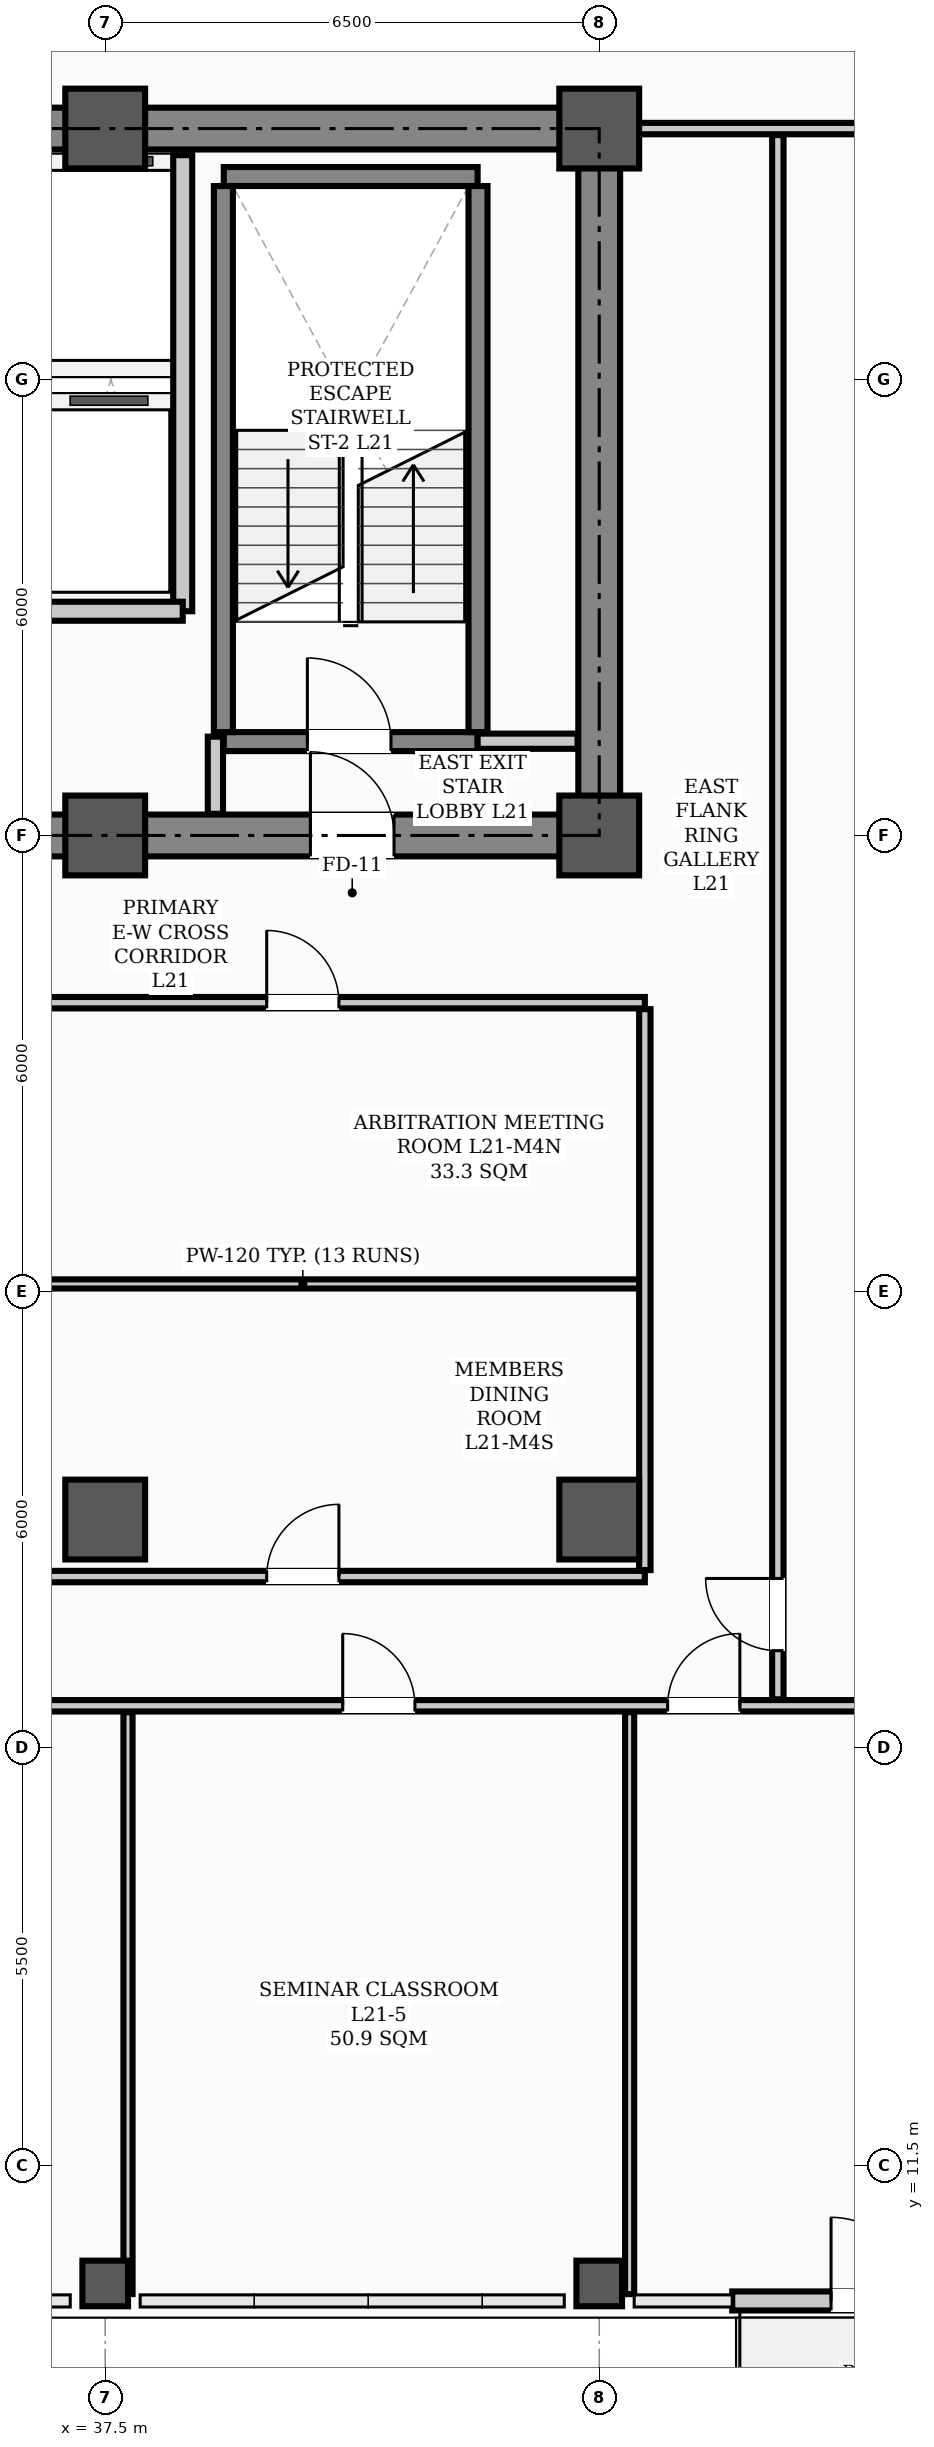
"""IFC4 building model, lengths in metres.
Left out: names, types, materials, properties, quantities, classifications, styles, units other than length and angle.
Written with IfcOpenShell. Run it as: python <this file> out.ifc"""

import sys

from ifc_helpers import new_model, si_unit, direction, frame, frame_2d, origin, origin_2d, place, context, subcontext, project, spatial, rectangle, hollow_rectangle, extrude, element, fill, save


model = new_model("IFC4")
c1 = context("Model", 3, precision=1e-05, world=origin(), true_north=direction((0.0, 1.0)))
c2 = subcontext(c1, "Body", "Model", "MODEL_VIEW")
j1 = project(units=[si_unit("LENGTHUNIT", "METRE"), si_unit("PLANEANGLEUNIT", "RADIAN")], contexts=[c1])
p1 = place(None, origin())
s1 = spatial("IfcSite", under=j1, at=p1, CompositionType="ELEMENT")
p2 = place(p1, origin())
s2 = spatial("IfcBuilding", under=s1, at=p2, CompositionType="ELEMENT")
p3 = place(p2, frame((0.0, 0.0, 85.0)))
s3 = spatial("IfcBuildingStorey", under=s2, at=p3, CompositionType="ELEMENT", Elevation=85.0)
for number, where, z_axis, x_axis in (
    (1, (37.5, 29.0, 0.0), (0.0, 0.0, 1.0), (1.0, 0.0, 0.0)),
    (2, (37.5, 38.3, 0.0), (0.0, 0.0, 1.0), (1.0, 0.0, 0.0)),
    (3, (44.0, 29.0, 0.0), (0.0, 0.0, 1.0), (1.0, 0.0, 0.0)),
    (4, (44.0, 38.3, 0.0), (0.0, 0.0, 1.0), (1.0, 0.0, 0.0)),
    (5, (37.5, 20.0, 0.0), (0.0, 0.0, 1.0), (1.0, 0.0, 0.0)),
    (6, (44.0, 20.0, 0.0), (0.0, 0.0, 1.0), (1.0, 0.0, 0.0)),
):
    element("IfcColumn", number, at=place(p3, frame(where, z_axis=z_axis, x_axis=x_axis)), inside=s3, PredefinedType="COLUMN", context=c2, shape_type="SweptSolid", body=[
        extrude(hollow_rectangle(XDim=1.05, YDim=1.05, WallThickness=0.038, InnerFilletRadius=0.019, OuterFilletRadius=0.057, at=origin_2d()), origin(), (0.0, 0.0, 1.0), 3.9),
    ])
for number, where, z_axis, x_axis in (
    (7, (37.5, 9.95, 0.0), (0.0, 0.0, 1.0), (1.0, 0.0, 0.0)),
    (8, (44.0, 9.95, 0.0), (0.0, 0.0, 1.0), (1.0, 0.0, 0.0)),
):
    element("IfcColumn", number, at=place(p3, frame(where, z_axis=z_axis, x_axis=x_axis)), inside=s3, PredefinedType="COLUMN", context=c2, shape_type="SweptSolid", body=[
        extrude(hollow_rectangle(XDim=0.6, YDim=0.6, WallThickness=0.026, InnerFilletRadius=0.013, OuterFilletRadius=0.039, at=origin_2d()), origin(), (0.0, 0.0, 1.0), 3.9),
    ])
p4 = place(p3, frame((45.75, 9.72, 0.0), z_axis=(0.0, 0.0, 1.0), x_axis=(1.0, 0.0, 0.0)))
e9 = element("IfcWall", 9, at=p4, inside=s3, PredefinedType="STANDARD", context=c2, shape_type="SweptSolid", body=[
    extrude(rectangle(XDim=3.7, YDim=0.25, at=frame_2d((1.85, 0.0))), origin(), (0.0, 0.0, 1.0), 3.18),
])
p5 = place(p4, frame((1.3, 0.0, 0.0)))
e10 = element("IfcOpeningElement", 10, at=p5, cuts=e9, PredefinedType="OPENING", context=c2, shape_type="SweptSolid", body=[
    extrude(rectangle(XDim=1.1, YDim=2.2, at=frame_2d((0.55, 1.1))), frame((0.0, 0.135, 0.0), z_axis=(0.0, -1.0, 0.0), x_axis=(1.0, 0.0, 0.0)), (0.0, 0.0, 1.0), 0.27),
])
p6 = place(p3, frame((13.5, 29.0, 0.0), z_axis=(0.0, 0.0, 1.0), x_axis=(1.0, 0.0, 0.0)))
e11 = element("IfcWall", 11, at=p6, inside=s3, PredefinedType="SHEAR", context=c2, shape_type="SweptSolid", body=[
    extrude(rectangle(XDim=30.5, YDim=0.55, at=frame_2d((15.25, 0.0))), origin(), (0.0, 0.0, 1.0), 3.72),
])
p7 = place(p6, frame((1.75, 0.0, 0.0)))
e12 = element("IfcOpeningElement", 12, at=p7, cuts=e11, PredefinedType="OPENING", context=c2, shape_type="SweptSolid", body=[
    extrude(rectangle(XDim=1.1, YDim=2.08, at=frame_2d((0.55, 1.04))), frame((0.0, 0.285, 0.0), z_axis=(0.0, -1.0, 0.0), x_axis=(1.0, 0.0, 0.0)), (0.0, 0.0, 1.0), 0.57),
])
p8 = place(p6, frame((26.7, 0.0, 0.0)))
e13 = element("IfcOpeningElement", 13, at=p8, cuts=e11, PredefinedType="OPENING", context=c2, shape_type="SweptSolid", body=[
    extrude(rectangle(XDim=1.1, YDim=2.08, at=frame_2d((0.55, 1.04))), frame((0.0, 0.285, 0.0), z_axis=(0.0, -1.0, 0.0), x_axis=(1.0, 0.0, 0.0)), (0.0, 0.0, 1.0), 0.57),
])
p9 = place(p6, frame((6.8, 0.0, 0.0)))
e14 = element("IfcOpeningElement", 14, at=p9, cuts=e11, PredefinedType="OPENING", context=c2, shape_type="SweptSolid", body=[
    extrude(rectangle(XDim=1.1, YDim=2.08, at=frame_2d((0.55, 1.04))), frame((0.0, 0.285, 0.0), z_axis=(0.0, -1.0, 0.0), x_axis=(1.0, 0.0, 0.0)), (0.0, 0.0, 1.0), 0.57),
])
p10 = place(p6, frame((13.2, 0.0, 0.0)))
e15 = element("IfcOpeningElement", 15, at=p10, cuts=e11, PredefinedType="OPENING", context=c2, shape_type="SweptSolid", body=[
    extrude(rectangle(XDim=1.6, YDim=2.08, at=frame_2d((0.8, 1.04))), frame((0.0, 0.285, 0.0), z_axis=(0.0, -1.0, 0.0), x_axis=(1.0, 0.0, 0.0)), (0.0, 0.0, 1.0), 0.57),
])
p11 = place(p6, frame((19.5, 0.0, 0.0)))
e16 = element("IfcOpeningElement", 16, at=p11, cuts=e11, PredefinedType="OPENING", context=c2, shape_type="SweptSolid", body=[
    extrude(rectangle(XDim=0.9, YDim=2.08, at=frame_2d((0.45, 1.04))), frame((0.0, 0.285, 0.0), z_axis=(0.0, -1.0, 0.0), x_axis=(1.0, 0.0, 0.0)), (0.0, 0.0, 1.0), 0.57),
])
p12 = place(p6, frame((21.55, 0.0, 0.0)))
e17 = element("IfcOpeningElement", 17, at=p12, cuts=e11, PredefinedType="OPENING", context=c2, shape_type="SweptSolid", body=[
    extrude(rectangle(XDim=0.9, YDim=2.08, at=frame_2d((0.45, 1.04))), frame((0.0, 0.285, 0.0), z_axis=(0.0, -1.0, 0.0), x_axis=(1.0, 0.0, 0.0)), (0.0, 0.0, 1.0), 0.57),
])
p13 = place(p3, frame((13.5, 38.3, 0.0), z_axis=(0.0, 0.0, 1.0), x_axis=(1.0, 0.0, 0.0)))
e18 = element("IfcWall", 18, at=p13, inside=s3, PredefinedType="SHEAR", context=c2, shape_type="SweptSolid", body=[
    extrude(rectangle(XDim=30.5, YDim=0.55, at=frame_2d((15.25, 0.0))), origin(), (0.0, 0.0, 1.0), 3.72),
])
p14 = place(p3, frame((44.0, 29.35, 0.0), z_axis=(0.0, 0.0, 1.0), x_axis=(0.0, 1.0, 0.0)))
e19 = element("IfcWall", 19, at=p14, inside=s3, PredefinedType="SHEAR", context=c2, shape_type="SweptSolid", body=[
    extrude(rectangle(XDim=8.6, YDim=0.55, at=frame_2d((4.3, 0.0))), origin(), (0.0, 0.0, 1.0), 3.72),
])
p15 = place(p3, frame((39.06, 30.235, 0.0), z_axis=(0.0, 0.0, 1.0), x_axis=(1.0, 0.0, 0.0)))
e20 = element("IfcWall", 20, at=p15, inside=s3, PredefinedType="STANDARD", context=c2, shape_type="SweptSolid", body=[
    extrude(rectangle(XDim=3.34, YDim=0.25, at=frame_2d((1.67, 0.0))), origin(), (0.0, 0.0, 1.0), 3.72),
])
p16 = place(p15, frame((1.1, 0.0, 0.0)))
e21 = element("IfcOpeningElement", 21, at=p16, cuts=e20, PredefinedType="OPENING", context=c2, shape_type="SweptSolid", body=[
    extrude(rectangle(XDim=1.1, YDim=2.08, at=frame_2d((0.55, 1.04))), frame((0.0, 0.135, 0.0), z_axis=(0.0, -1.0, 0.0), x_axis=(1.0, 0.0, 0.0)), (0.0, 0.0, 1.0), 0.27),
])
p17 = place(p3, frame((39.06, 37.669, 0.0), z_axis=(0.0, 0.0, 1.0), x_axis=(1.0, 0.0, 0.0)))
e22 = element("IfcWall", 22, at=p17, inside=s3, PredefinedType="STANDARD", context=c2, shape_type="SweptSolid", body=[
    extrude(rectangle(XDim=3.34, YDim=0.25, at=frame_2d((1.67, 0.0))), origin(), (0.0, 0.0, 1.0), 3.72),
])
for number, where, z_axis, x_axis in (
    (23, (39.055, 30.36, 0.0), (0.0, 0.0, 1.0), (0.0, 1.0, 0.0)),
    (24, (42.405, 30.36, 0.0), (0.0, 0.0, 1.0), (0.0, 1.0, 0.0)),
):
    element("IfcWall", number, at=place(p3, frame(where, z_axis=z_axis, x_axis=x_axis)), inside=s3, PredefinedType="STANDARD", context=c2, shape_type="SweptSolid", body=[
        extrude(rectangle(XDim=7.184, YDim=0.25, at=frame_2d((3.592, 0.0))), origin(), (0.0, 0.0, 1.0), 3.72),
    ])
p18 = place(p3, frame((38.52, 31.95, 0.0), z_axis=(0.0, 0.0, 1.0), x_axis=(0.0, 1.0, 0.0)))
e25 = element("IfcWall", 25, at=p18, inside=s3, PredefinedType="STANDARD", context=c2, shape_type="SweptSolid", body=[
    extrude(rectangle(XDim=6.0, YDim=0.25, at=frame_2d((3.0, 0.0))), origin(), (0.0, 0.0, 1.0), 3.3),
])
p19 = place(p3, frame((36.62, 31.95, 0.0), z_axis=(0.0, 0.0, 1.0), x_axis=(1.0, 0.0, 0.0)))
e26 = element("IfcWall", 26, at=p19, inside=s3, PredefinedType="STANDARD", context=c2, shape_type="SweptSolid", body=[
    extrude(rectangle(XDim=1.9, YDim=0.25, at=frame_2d((0.95, 0.0))), origin(), (0.0, 0.0, 1.0), 3.48),
])
p20 = place(p3, frame((42.4, 30.24, 0.0), z_axis=(0.0, 0.0, 1.0), x_axis=(1.0, 0.0, 0.0)))
e27 = element("IfcWall", 27, at=p20, inside=s3, PredefinedType="STANDARD", context=c2, shape_type="SweptSolid", body=[
    extrude(rectangle(XDim=1.315, YDim=0.2, at=frame_2d((0.658, 0.0))), origin(), (0.0, 0.0, 1.0), 3.1),
])
p21 = place(p3, frame((12.9, 26.8, 0.0), z_axis=(0.0, 0.0, 1.0), x_axis=(1.0, 0.0, 0.0)))
e28 = element("IfcWall", 28, at=p21, inside=s3, PredefinedType="PARTITIONING", context=c2, shape_type="SweptSolid", body=[
    extrude(rectangle(XDim=31.7, YDim=0.15, at=frame_2d((15.85, 0.0))), origin(), (0.0, 0.0, 1.0), 3.1),
])
p22 = place(p21, frame((13.6, 0.0, 0.0)))
e29 = element("IfcOpeningElement", 29, at=p22, cuts=e28, PredefinedType="OPENING", context=c2, shape_type="SweptSolid", body=[
    extrude(rectangle(XDim=1.6, YDim=2.08, at=frame_2d((0.8, 1.04))), frame((0.0, 0.085, 0.0), z_axis=(0.0, -1.0, 0.0), x_axis=(1.0, 0.0, 0.0)), (0.0, 0.0, 1.0), 0.17),
])
p23 = place(p21, frame((3.275, 0.0, 0.0)))
e30 = element("IfcOpeningElement", 30, at=p23, cuts=e28, PredefinedType="OPENING", context=c2, shape_type="SweptSolid", body=[
    extrude(rectangle(XDim=0.95, YDim=2.08, at=frame_2d((0.475, 1.04))), frame((0.0, 0.085, 0.0), z_axis=(0.0, -1.0, 0.0), x_axis=(1.0, 0.0, 0.0)), (0.0, 0.0, 1.0), 0.17),
])
p24 = place(p21, frame((9.025, 0.0, 0.0)))
e31 = element("IfcOpeningElement", 31, at=p24, cuts=e28, PredefinedType="OPENING", context=c2, shape_type="SweptSolid", body=[
    extrude(rectangle(XDim=0.95, YDim=2.08, at=frame_2d((0.475, 1.04))), frame((0.0, 0.085, 0.0), z_axis=(0.0, -1.0, 0.0), x_axis=(1.0, 0.0, 0.0)), (0.0, 0.0, 1.0), 0.17),
])
p25 = place(p21, frame((19.525, 0.0, 0.0)))
e32 = element("IfcOpeningElement", 32, at=p25, cuts=e28, PredefinedType="OPENING", context=c2, shape_type="SweptSolid", body=[
    extrude(rectangle(XDim=0.95, YDim=2.08, at=frame_2d((0.475, 1.04))), frame((0.0, 0.085, 0.0), z_axis=(0.0, -1.0, 0.0), x_axis=(1.0, 0.0, 0.0)), (0.0, 0.0, 1.0), 0.17),
])
p26 = place(p21, frame((26.725, 0.0, 0.0)))
e33 = element("IfcOpeningElement", 33, at=p26, cuts=e28, PredefinedType="OPENING", context=c2, shape_type="SweptSolid", body=[
    extrude(rectangle(XDim=0.95, YDim=2.08, at=frame_2d((0.475, 1.04))), frame((0.0, 0.085, 0.0), z_axis=(0.0, -1.0, 0.0), x_axis=(1.0, 0.0, 0.0)), (0.0, 0.0, 1.0), 0.17),
])
p27 = place(p3, frame((7.81, 17.55, 0.0), z_axis=(0.0, 0.0, 1.0), x_axis=(1.0, 0.0, 0.0)))
e34 = element("IfcWall", 34, at=p27, inside=s3, PredefinedType="PARTITIONING", context=c2, shape_type="SweptSolid", body=[
    extrude(rectangle(XDim=49.38, YDim=0.15, at=frame_2d((24.69, 0.0))), origin(), (0.0, 0.0, 1.0), 3.1),
])
p28 = place(p27, frame((7.465, 0.0, 0.0)))
e35 = element("IfcOpeningElement", 35, at=p28, cuts=e34, PredefinedType="OPENING", context=c2, shape_type="SweptSolid", body=[
    extrude(rectangle(XDim=0.95, YDim=2.08, at=frame_2d((0.475, 1.04))), frame((0.0, 0.085, 0.0), z_axis=(0.0, -1.0, 0.0), x_axis=(1.0, 0.0, 0.0)), (0.0, 0.0, 1.0), 0.17),
])
p29 = place(p27, frame((11.915, 0.0, 0.0)))
e36 = element("IfcOpeningElement", 36, at=p29, cuts=e34, PredefinedType="OPENING", context=c2, shape_type="SweptSolid", body=[
    extrude(rectangle(XDim=0.95, YDim=2.08, at=frame_2d((0.475, 1.04))), frame((0.0, 0.085, 0.0), z_axis=(0.0, -1.0, 0.0), x_axis=(1.0, 0.0, 0.0)), (0.0, 0.0, 1.0), 0.17),
])
p30 = place(p27, frame((18.915, 0.0, 0.0)))
e37 = element("IfcOpeningElement", 37, at=p30, cuts=e34, PredefinedType="OPENING", context=c2, shape_type="SweptSolid", body=[
    extrude(rectangle(XDim=0.95, YDim=2.08, at=frame_2d((0.475, 1.04))), frame((0.0, 0.085, 0.0), z_axis=(0.0, -1.0, 0.0), x_axis=(1.0, 0.0, 0.0)), (0.0, 0.0, 1.0), 0.17),
])
p31 = place(p27, frame((26.015, 0.0, 0.0)))
e38 = element("IfcOpeningElement", 38, at=p31, cuts=e34, PredefinedType="OPENING", context=c2, shape_type="SweptSolid", body=[
    extrude(rectangle(XDim=0.95, YDim=2.08, at=frame_2d((0.475, 1.04))), frame((0.0, 0.085, 0.0), z_axis=(0.0, -1.0, 0.0), x_axis=(1.0, 0.0, 0.0)), (0.0, 0.0, 1.0), 0.17),
])
p32 = place(p27, frame((32.815, 0.0, 0.0)))
e39 = element("IfcOpeningElement", 39, at=p32, cuts=e34, PredefinedType="OPENING", context=c2, shape_type="SweptSolid", body=[
    extrude(rectangle(XDim=0.95, YDim=2.08, at=frame_2d((0.475, 1.04))), frame((0.0, 0.085, 0.0), z_axis=(0.0, -1.0, 0.0), x_axis=(1.0, 0.0, 0.0)), (0.0, 0.0, 1.0), 0.17),
])
p33 = place(p27, frame((37.09, 0.0, 0.0)))
e40 = element("IfcOpeningElement", 40, at=p33, cuts=e34, PredefinedType="OPENING", context=c2, shape_type="SweptSolid", body=[
    extrude(rectangle(XDim=0.95, YDim=2.08, at=frame_2d((0.475, 1.04))), frame((0.0, 0.085, 0.0), z_axis=(0.0, -1.0, 0.0), x_axis=(1.0, 0.0, 0.0)), (0.0, 0.0, 1.0), 0.17),
])
p34 = place(p3, frame((28.4, 19.25, 0.0), z_axis=(0.0, 0.0, 1.0), x_axis=(1.0, 0.0, 0.0)))
e41 = element("IfcWall", 41, at=p34, inside=s3, PredefinedType="PARTITIONING", context=c2, shape_type="SweptSolid", body=[
    extrude(rectangle(XDim=16.2, YDim=0.15, at=frame_2d((8.1, 0.0))), origin(), (0.0, 0.0, 1.0), 3.1),
])
p35 = place(p34, frame((4.025, 0.0, 0.0)))
e42 = element("IfcOpeningElement", 42, at=p35, cuts=e41, PredefinedType="OPENING", context=c2, shape_type="SweptSolid", body=[
    extrude(rectangle(XDim=0.95, YDim=2.08, at=frame_2d((0.475, 1.04))), frame((0.0, 0.085, 0.0), z_axis=(0.0, -1.0, 0.0), x_axis=(1.0, 0.0, 0.0)), (0.0, 0.0, 1.0), 0.17),
])
p36 = place(p34, frame((11.225, 0.0, 0.0)))
e43 = element("IfcOpeningElement", 43, at=p36, cuts=e41, PredefinedType="OPENING", context=c2, shape_type="SweptSolid", body=[
    extrude(rectangle(XDim=0.95, YDim=2.08, at=frame_2d((0.475, 1.04))), frame((0.0, 0.085, 0.0), z_axis=(0.0, -1.0, 0.0), x_axis=(1.0, 0.0, 0.0)), (0.0, 0.0, 1.0), 0.17),
])
p37 = place(p3, frame((44.0, 38.3, 0.0), z_axis=(0.0, 0.0, 1.0), x_axis=(1.0, 0.0, 0.0)))
e44 = element("IfcWall", 44, at=p37, inside=s3, PredefinedType="PARTITIONING", context=c2, shape_type="SweptSolid", body=[
    extrude(rectangle(XDim=13.19, YDim=0.15, at=frame_2d((6.595, 0.0))), origin(), (0.0, 0.0, 1.0), 3.0),
])
p38 = place(p3, frame((35.6, 23.1, 0.0), z_axis=(0.0, 0.0, 1.0), x_axis=(1.0, 0.0, 0.0)))
e45 = element("IfcWall", 45, at=p38, inside=s3, PredefinedType="PARTITIONING", context=c2, shape_type="SweptSolid", body=[
    extrude(rectangle(XDim=9.0, YDim=0.12, at=frame_2d((4.5, 0.0))), origin(), (0.0, 0.0, 1.0), 3.1),
])
p39 = place(p3, frame((38.95, 29.285, 0.0), z_axis=(0.0, 0.0, 1.0), x_axis=(0.0, 1.0, 0.0)))
e46 = element("IfcWall", 46, at=p39, inside=s3, PredefinedType="STANDARD", context=c2, shape_type="SweptSolid", body=[
    extrude(rectangle(XDim=1.015, YDim=0.2, at=frame_2d((0.508, 0.0))), origin(), (0.0, 0.0, 1.0), 3.3),
])
p40 = place(p3, frame((46.35, 17.635, 0.0), z_axis=(0.0, 0.0, 1.0), x_axis=(0.0, 1.0, 0.0)))
e47 = element("IfcWall", 47, at=p40, inside=s3, PredefinedType="PARTITIONING", context=c2, shape_type="SweptSolid", body=[
    extrude(rectangle(XDim=20.58, YDim=0.15, at=frame_2d((10.29, 0.0))), origin(), (0.0, 0.0, 1.0), 3.0),
])
p41 = place(p40, frame((0.64, 0.0, 0.0)))
e48 = element("IfcOpeningElement", 48, at=p41, cuts=e47, PredefinedType="OPENING", context=c2, shape_type="SweptSolid", body=[
    extrude(rectangle(XDim=0.95, YDim=2.08, at=frame_2d((0.475, 1.04))), frame((0.0, 0.085, 0.0), z_axis=(0.0, -1.0, 0.0), x_axis=(1.0, 0.0, 0.0)), (0.0, 0.0, 1.0), 0.17),
])
p42 = place(p3, frame((44.6, 19.335, 0.0), z_axis=(0.0, 0.0, 1.0), x_axis=(0.0, 1.0, 0.0)))
e49 = element("IfcWall", 49, at=p42, inside=s3, PredefinedType="PARTITIONING", context=c2, shape_type="SweptSolid", body=[
    extrude(rectangle(XDim=7.38, YDim=0.15, at=frame_2d((3.69, 0.0))), origin(), (0.0, 0.0, 1.0), 3.0),
])
for number, where, z_axis, x_axis in (
    (50, (37.8, 9.81, 0.0), (0.0, 0.0, 1.0), (0.0, 1.0, 0.0)),
    (51, (44.4, 9.81, 0.0), (0.0, 0.0, 1.0), (0.0, 1.0, 0.0)),
):
    element("IfcWall", number, at=place(p3, frame(where, z_axis=z_axis, x_axis=x_axis)), inside=s3, PredefinedType="PARTITIONING", context=c2, shape_type="SweptSolid", body=[
        extrude(rectangle(XDim=7.655, YDim=0.12, at=frame_2d((3.828, 0.0))), origin(), (0.0, 0.0, 1.0), 3.1),
    ])
p43 = place(p5, origin())
e52 = element("IfcDoor", 52, at=p43, inside=s3, OperationType="SINGLE_SWING_LEFT", PredefinedType="DOOR", context=c2, shape_type="SweptSolid", body=[
    extrude(rectangle(XDim=1.1, YDim=2.2, at=frame_2d((0.55, 1.1))), frame((0.0, 0.025, 0.0), z_axis=(0.0, -1.0, 0.0), x_axis=(1.0, 0.0, 0.0)), (0.0, 0.0, 1.0), 0.05),
])
fill(e10, e52)
p44 = place(p16, origin())
e53 = element("IfcDoor", 53, at=p44, inside=s3, OperationType="SINGLE_SWING_LEFT", PredefinedType="DOOR", context=c2, shape_type="SweptSolid", body=[
    extrude(rectangle(XDim=1.1, YDim=2.08, at=frame_2d((0.55, 1.04))), frame((0.0, 0.025, 0.0), z_axis=(0.0, -1.0, 0.0), x_axis=(1.0, 0.0, 0.0)), (0.0, 0.0, 1.0), 0.05),
])
fill(e21, e53)
p45 = place(p8, origin())
e54 = element("IfcDoor", 54, at=p45, inside=s3, OperationType="SINGLE_SWING_LEFT", PredefinedType="DOOR", context=c2, shape_type="SweptSolid", body=[
    extrude(rectangle(XDim=1.1, YDim=2.08, at=frame_2d((0.55, 1.04))), frame((0.0, 0.025, 0.0), z_axis=(0.0, -1.0, 0.0), x_axis=(1.0, 0.0, 0.0)), (0.0, 0.0, 1.0), 0.05),
])
fill(e13, e54)
p46 = place(p32, origin())
e55 = element("IfcDoor", 55, at=p46, inside=s3, OperationType="SINGLE_SWING_LEFT", PredefinedType="DOOR", context=c2, shape_type="SweptSolid", body=[
    extrude(rectangle(XDim=0.95, YDim=2.08, at=frame_2d((0.475, 1.04))), frame((0.0, 0.025, 0.0), z_axis=(0.0, -1.0, 0.0), x_axis=(1.0, 0.0, 0.0)), (0.0, 0.0, 1.0), 0.05),
])
fill(e39, e55)
p47 = place(p33, origin())
e56 = element("IfcDoor", 56, at=p47, inside=s3, OperationType="SINGLE_SWING_RIGHT", PredefinedType="DOOR", context=c2, shape_type="SweptSolid", body=[
    extrude(rectangle(XDim=0.95, YDim=2.08, at=frame_2d((0.475, 1.04))), frame((0.0, 0.025, 0.0), z_axis=(0.0, -1.0, 0.0), x_axis=(1.0, 0.0, 0.0)), (0.0, 0.0, 1.0), 0.05),
])
fill(e40, e56)
p48 = place(p26, origin())
e57 = element("IfcDoor", 57, at=p48, inside=s3, OperationType="SINGLE_SWING_LEFT", PredefinedType="DOOR", context=c2, shape_type="SweptSolid", body=[
    extrude(rectangle(XDim=0.95, YDim=2.08, at=frame_2d((0.475, 1.04))), frame((0.0, 0.025, 0.0), z_axis=(0.0, -1.0, 0.0), x_axis=(1.0, 0.0, 0.0)), (0.0, 0.0, 1.0), 0.05),
])
fill(e33, e57)
p49 = place(p36, origin())
e58 = element("IfcDoor", 58, at=p49, inside=s3, OperationType="SINGLE_SWING_RIGHT", PredefinedType="DOOR", context=c2, shape_type="SweptSolid", body=[
    extrude(rectangle(XDim=0.95, YDim=2.08, at=frame_2d((0.475, 1.04))), frame((0.0, 0.025, 0.0), z_axis=(0.0, -1.0, 0.0), x_axis=(1.0, 0.0, 0.0)), (0.0, 0.0, 1.0), 0.05),
])
fill(e43, e58)
p50 = place(p41, origin())
e59 = element("IfcDoor", 59, at=p50, inside=s3, OperationType="SINGLE_SWING_RIGHT", PredefinedType="DOOR", context=c2, shape_type="SweptSolid", body=[
    extrude(rectangle(XDim=0.95, YDim=2.08, at=frame_2d((0.475, 1.04))), frame((0.0, 0.025, 0.0), z_axis=(0.0, -1.0, 0.0), x_axis=(1.0, 0.0, 0.0)), (0.0, 0.0, 1.0), 0.05),
])
fill(e48, e59)
save(model, sys.argv[1])
